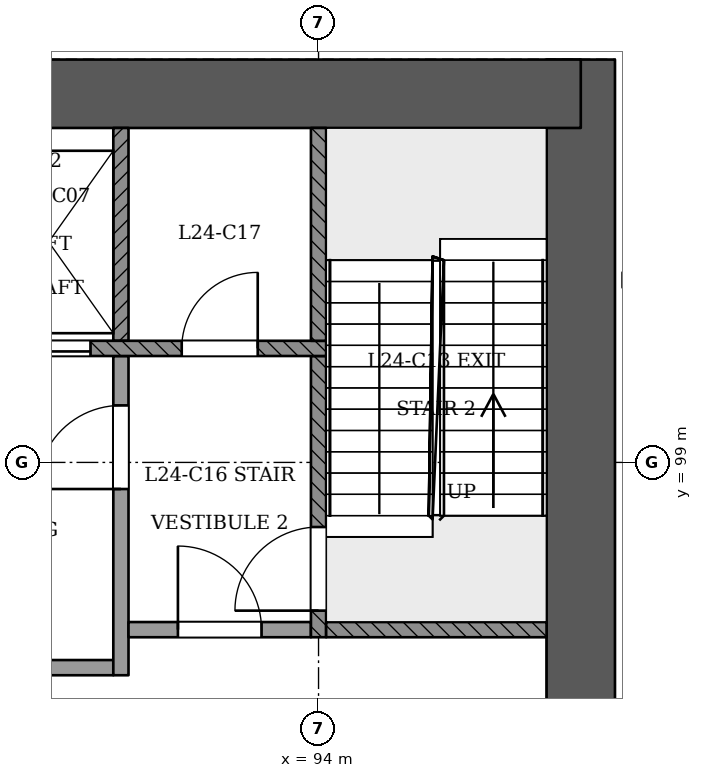
"""IFC4 building model, lengths in metres.
Left out: names, types, materials, properties, quantities, classifications, styles, units other than length and angle.
Written with IfcOpenShell. Run it as: python <this file> out.ifc"""

import sys

from ifc_helpers import new_model, si_unit, direction, frame, frame_2d, origin, place, context, subcontext, project, spatial, rectangle, extrude, element, fill, save


model = new_model("IFC4")
c1 = context("Model", 3, precision=1e-05, world=origin(), true_north=direction((0.0, 1.0)))
c2 = subcontext(c1, "Body", "Model", "MODEL_VIEW")
j1 = project(units=[si_unit("LENGTHUNIT", "METRE"), si_unit("PLANEANGLEUNIT", "RADIAN")], contexts=[c1])
p1 = place(None, origin())
s1 = spatial("IfcSite", under=j1, at=p1, CompositionType="ELEMENT")
p2 = place(p1, origin())
s2 = spatial("IfcBuilding", under=s1, at=p2, CompositionType="ELEMENT")
p3 = place(p2, frame((0.0, 0.0, 95.4)))
s3 = spatial("IfcBuildingStorey", under=s2, at=p3, CompositionType="ELEMENT", Elevation=95.4)
p4 = place(p3, frame((97.45, 92.95, 0.0), z_axis=(0.0, 0.0, 1.0), x_axis=(0.0, 1.0, 0.0)))
e1 = element("IfcWall", 1, at=p4, inside=s3, PredefinedType="SHEAR", context=c2, shape_type="SweptSolid", body=[
    extrude(rectangle(XDim=11.35, YDim=0.9, at=frame_2d((5.675, 0.0))), origin(), (0.0, 0.0, 1.0), 5.4),
])
p5 = place(p3, frame((97.45, 103.85, 0.0), z_axis=(0.0, 0.0, 1.0), x_axis=(-1.0, 0.0, 0.0)))
e2 = element("IfcWall", 2, at=p5, inside=s3, PredefinedType="SHEAR", context=c2, shape_type="SweptSolid", body=[
    extrude(rectangle(XDim=25.35, YDim=0.9, at=frame_2d((12.675, 0.0))), origin(), (0.0, 0.0, 1.0), 5.4),
])
p6 = place(p3, frame((85.516, 61.158, 0.0), z_axis=(0.0, 0.0, 1.0), x_axis=(0.499997295205, 0.866026965393, 0.0)))
e3 = element("IfcWall", 3, at=p6, inside=s3, PredefinedType="PARTITIONING", context=c2, shape_type="SweptSolid", body=[
    extrude(rectangle(XDim=42.086, YDim=0.2, at=frame_2d((21.043, 0.0))), origin(), (0.0, 0.0, 1.0), 4.5),
])
p7 = place(p6, frame((0.2, 0.0, 0.0)))
e4 = element("IfcOpeningElement", 4, at=p7, cuts=e3, PredefinedType="OPENING", context=c2, shape_type="SweptSolid", body=[
    extrude(rectangle(XDim=1.2, YDim=2.4, at=frame_2d((0.6, 1.2))), frame((0.0, 0.11, 0.0), z_axis=(0.0, -1.0, 0.0), x_axis=(1.0, 0.0, 0.0)), (0.0, 0.0, 1.0), 0.221),
])
p8 = place(p6, frame((9.193, 0.0, 0.0)))
e5 = element("IfcOpeningElement", 5, at=p8, cuts=e3, PredefinedType="OPENING", context=c2, shape_type="SweptSolid", body=[
    extrude(rectangle(XDim=1.2, YDim=2.4, at=frame_2d((0.6, 1.2))), frame((0.0, 0.11, 0.0), z_axis=(0.0, -1.0, 0.0), x_axis=(1.0, 0.0, 0.0)), (0.0, 0.0, 1.0), 0.221),
])
p9 = place(p6, frame((20.443, 0.0, 0.0)))
e6 = element("IfcOpeningElement", 6, at=p9, cuts=e3, PredefinedType="OPENING", context=c2, shape_type="SweptSolid", body=[
    extrude(rectangle(XDim=1.2, YDim=2.4, at=frame_2d((0.6, 1.2))), frame((0.0, 0.11, 0.0), z_axis=(0.0, -1.0, 0.0), x_axis=(1.0, 0.0, 0.0)), (0.0, 0.0, 1.0), 0.221),
])
p10 = place(p6, frame((29.443, 0.0, 0.0)))
e7 = element("IfcOpeningElement", 7, at=p10, cuts=e3, PredefinedType="OPENING", context=c2, shape_type="SweptSolid", body=[
    extrude(rectangle(XDim=1.2, YDim=2.4, at=frame_2d((0.6, 1.2))), frame((0.0, 0.11, 0.0), z_axis=(0.0, -1.0, 0.0), x_axis=(1.0, 0.0, 0.0)), (0.0, 0.0, 1.0), 0.221),
])
p11 = place(p6, frame((40.184, 0.0, 0.0)))
e8 = element("IfcOpeningElement", 8, at=p11, cuts=e3, PredefinedType="OPENING", context=c2, shape_type="SweptSolid", body=[
    extrude(rectangle(XDim=1.2, YDim=2.4, at=frame_2d((0.6, 1.2))), frame((0.0, 0.11, 0.0), z_axis=(0.0, -1.0, 0.0), x_axis=(1.0, 0.0, 0.0)), (0.0, 0.0, 1.0), 0.221),
])
p12 = place(p3, frame((99.7, 101.4, 0.0), z_axis=(0.0, 0.0, 1.0), x_axis=(-1.0, 0.0, 0.0)))
e9 = element("IfcWall", 9, at=p12, inside=s3, PredefinedType="PARTITIONING", context=c2, shape_type="SweptSolid", body=[
    extrude(rectangle(XDim=1.7, YDim=0.2, at=frame_2d((0.85, 0.0))), origin(), (0.0, 0.0, 1.0), 4.9),
])
p13 = place(p3, frame((87.7, 96.3, 0.0), z_axis=(0.0, 0.0, 1.0), x_axis=(1.0, 0.0, 0.0)))
e10 = element("IfcWall", 10, at=p13, inside=s3, PredefinedType="PARTITIONING", context=c2, shape_type="SweptSolid", body=[
    extrude(rectangle(XDim=3.6, YDim=0.2, at=frame_2d((1.8, 0.0))), origin(), (0.0, 0.0, 1.0), 4.9),
])
p14 = place(p3, frame((91.4, 96.2, 0.0), z_axis=(0.0, 0.0, 1.0), x_axis=(0.0, 1.0, 0.0)))
e11 = element("IfcWall", 11, at=p14, inside=s3, PredefinedType="PARTITIONING", context=c2, shape_type="SweptSolid", body=[
    extrude(rectangle(XDim=4.2, YDim=0.2, at=frame_2d((2.1, 0.0))), origin(), (0.0, 0.0, 1.0), 4.9),
])
p15 = place(p14, frame((2.45, 0.0, 0.0)))
e12 = element("IfcOpeningElement", 12, at=p15, cuts=e11, PredefinedType="OPENING", context=c2, shape_type="SweptSolid", body=[
    extrude(rectangle(XDim=1.1, YDim=2.1, at=frame_2d((0.55, 1.05))), frame((0.0, 0.11, 0.0), z_axis=(0.0, -1.0, 0.0), x_axis=(1.0, 0.0, 0.0)), (0.0, 0.0, 1.0), 0.221),
])
p16 = place(p3, frame((91.5, 96.8, 0.0), z_axis=(0.0, 0.0, 1.0), x_axis=(1.0, 0.0, 0.0)))
e13 = element("IfcWall", 13, at=p16, inside=s3, PredefinedType="PARTITIONING", context=c2, shape_type="SweptSolid", body=[
    extrude(rectangle(XDim=2.4, YDim=0.2, at=frame_2d((1.2, 0.0))), origin(), (0.0, 0.0, 1.0), 4.9),
])
p17 = place(p16, frame((0.65, 0.0, 0.0)))
e14 = element("IfcOpeningElement", 14, at=p17, cuts=e13, PredefinedType="OPENING", context=c2, shape_type="SweptSolid", body=[
    extrude(rectangle(XDim=1.1, YDim=2.1, at=frame_2d((0.55, 1.05))), frame((0.0, 0.11, 0.0), z_axis=(0.0, -1.0, 0.0), x_axis=(1.0, 0.0, 0.0)), (0.0, 0.0, 1.0), 0.221),
])
p18 = place(p3, frame((94.0, 96.7, 0.0), z_axis=(0.0, 0.0, 1.0), x_axis=(0.0, 1.0, 0.0)))
e15 = element("IfcWall", 15, at=p18, inside=s3, PredefinedType="SOLIDWALL", context=c2, shape_type="SweptSolid", body=[
    extrude(rectangle(XDim=3.7, YDim=0.2, at=frame_2d((1.85, 0.0))), origin(), (0.0, 0.0, 1.0), 4.9),
])
p19 = place(p18, frame((0.35, 0.0, 0.0)))
e16 = element("IfcOpeningElement", 16, at=p19, cuts=e15, PredefinedType="OPENING", context=c2, shape_type="SweptSolid", body=[
    extrude(rectangle(XDim=1.1, YDim=2.1, at=frame_2d((0.55, 1.05))), frame((0.0, 0.11, 0.0), z_axis=(0.0, -1.0, 0.0), x_axis=(1.0, 0.0, 0.0)), (0.0, 0.0, 1.0), 0.221),
])
p20 = place(p3, frame((94.1, 96.8, 0.0), z_axis=(0.0, 0.0, 1.0), x_axis=(1.0, 0.0, 0.0)))
e17 = element("IfcWall", 17, at=p20, inside=s3, PredefinedType="SOLIDWALL", context=c2, shape_type="SweptSolid", body=[
    extrude(rectangle(XDim=2.9, YDim=0.2, at=frame_2d((1.45, 0.0))), origin(), (0.0, 0.0, 1.0), 4.9),
])
p21 = place(p3, frame((75.9, 100.5, 0.0), z_axis=(0.0, 0.0, 1.0), x_axis=(1.0, 0.0, 0.0)))
e18 = element("IfcWall", 18, at=p21, inside=s3, PredefinedType="SOLIDWALL", context=c2, shape_type="SweptSolid", body=[
    extrude(rectangle(XDim=18.2, YDim=0.2, at=frame_2d((9.1, 0.0))), origin(), (0.0, 0.0, 1.0), 4.9),
])
p22 = place(p21, frame((2.6, 0.0, 0.0)))
e19 = element("IfcOpeningElement", 19, at=p22, cuts=e18, PredefinedType="OPENING", context=c2, shape_type="SweptSolid", body=[
    extrude(rectangle(XDim=1.1, YDim=2.1, at=frame_2d((0.55, 1.05))), frame((0.0, 0.11, 0.0), z_axis=(0.0, -1.0, 0.0), x_axis=(1.0, 0.0, 0.0)), (0.0, 0.0, 1.0), 0.221),
])
p23 = place(p21, frame((4.5, 0.0, 0.0)))
e20 = element("IfcOpeningElement", 20, at=p23, cuts=e18, PredefinedType="OPENING", context=c2, shape_type="SweptSolid", body=[
    extrude(rectangle(XDim=1.1, YDim=2.1, at=frame_2d((0.55, 1.05))), frame((0.0, 0.11, 0.0), z_axis=(0.0, -1.0, 0.0), x_axis=(1.0, 0.0, 0.0)), (0.0, 0.0, 1.0), 0.221),
])
p24 = place(p21, frame((6.4, 0.0, 0.0)))
e21 = element("IfcOpeningElement", 21, at=p24, cuts=e18, PredefinedType="OPENING", context=c2, shape_type="SweptSolid", body=[
    extrude(rectangle(XDim=1.1, YDim=2.1, at=frame_2d((0.55, 1.05))), frame((0.0, 0.11, 0.0), z_axis=(0.0, -1.0, 0.0), x_axis=(1.0, 0.0, 0.0)), (0.0, 0.0, 1.0), 0.221),
])
p25 = place(p21, frame((8.3, 0.0, 0.0)))
e22 = element("IfcOpeningElement", 22, at=p25, cuts=e18, PredefinedType="OPENING", context=c2, shape_type="SweptSolid", body=[
    extrude(rectangle(XDim=1.1, YDim=2.1, at=frame_2d((0.55, 1.05))), frame((0.0, 0.11, 0.0), z_axis=(0.0, -1.0, 0.0), x_axis=(1.0, 0.0, 0.0)), (0.0, 0.0, 1.0), 0.221),
])
p26 = place(p21, frame((10.2, 0.0, 0.0)))
e23 = element("IfcOpeningElement", 23, at=p26, cuts=e18, PredefinedType="OPENING", context=c2, shape_type="SweptSolid", body=[
    extrude(rectangle(XDim=1.1, YDim=2.1, at=frame_2d((0.55, 1.05))), frame((0.0, 0.11, 0.0), z_axis=(0.0, -1.0, 0.0), x_axis=(1.0, 0.0, 0.0)), (0.0, 0.0, 1.0), 0.221),
])
p27 = place(p21, frame((12.1, 0.0, 0.0)))
e24 = element("IfcOpeningElement", 24, at=p27, cuts=e18, PredefinedType="OPENING", context=c2, shape_type="SweptSolid", body=[
    extrude(rectangle(XDim=1.1, YDim=2.1, at=frame_2d((0.55, 1.05))), frame((0.0, 0.11, 0.0), z_axis=(0.0, -1.0, 0.0), x_axis=(1.0, 0.0, 0.0)), (0.0, 0.0, 1.0), 0.221),
])
p28 = place(p21, frame((14.0, 0.0, 0.0)))
e25 = element("IfcOpeningElement", 25, at=p28, cuts=e18, PredefinedType="OPENING", context=c2, shape_type="SweptSolid", body=[
    extrude(rectangle(XDim=1.1, YDim=2.1, at=frame_2d((0.55, 1.05))), frame((0.0, 0.11, 0.0), z_axis=(0.0, -1.0, 0.0), x_axis=(1.0, 0.0, 0.0)), (0.0, 0.0, 1.0), 0.221),
])
p29 = place(p21, frame((0.65, 0.0, 0.0)))
e26 = element("IfcOpeningElement", 26, at=p29, cuts=e18, PredefinedType="OPENING", context=c2, shape_type="SweptSolid", body=[
    extrude(rectangle(XDim=1.0, YDim=2.1, at=frame_2d((0.5, 1.05))), frame((0.0, 0.11, 0.0), z_axis=(0.0, -1.0, 0.0), x_axis=(1.0, 0.0, 0.0)), (0.0, 0.0, 1.0), 0.221),
])
p30 = place(p21, frame((16.3, 0.0, 0.0)))
e27 = element("IfcOpeningElement", 27, at=p30, cuts=e18, PredefinedType="OPENING", context=c2, shape_type="SweptSolid", body=[
    extrude(rectangle(XDim=1.0, YDim=2.1, at=frame_2d((0.5, 1.05))), frame((0.0, 0.11, 0.0), z_axis=(0.0, -1.0, 0.0), x_axis=(1.0, 0.0, 0.0)), (0.0, 0.0, 1.0), 0.221),
])
for number, where, z_axis, x_axis in (
    (28, (91.4, 100.6, 0.0), (0.0, 0.0, 1.0), (0.0, 1.0, 0.0)),
    (29, (94.0, 100.6, 0.0), (0.0, 0.0, 1.0), (0.0, 1.0, 0.0)),
):
    element("IfcWall", number, at=place(p3, frame(where, z_axis=z_axis, x_axis=x_axis)), inside=s3, PredefinedType="SOLIDWALL", context=c2, shape_type="SweptSolid", body=[
        extrude(rectangle(XDim=2.8, YDim=0.2, at=frame_2d((1.4, 0.0))), origin(), (0.0, 0.0, 1.0), 4.9),
    ])
p31 = place(p28, origin())
e30 = element("IfcDoor", 30, at=p31, inside=s3, OperationType="SLIDING_TO_LEFT", PredefinedType="NOTDEFINED", context=c2, shape_type="SweptSolid", body=[
    extrude(rectangle(XDim=1.1, YDim=2.1, at=frame_2d((0.55, 1.05))), frame((0.0, 0.025, 0.0), z_axis=(0.0, -1.0, 0.0), x_axis=(1.0, 0.0, 0.0)), (0.0, 0.0, 1.0), 0.05),
])
fill(e25, e30)
p32 = place(p19, origin())
e31 = element("IfcDoor", 31, at=p32, inside=s3, OperationType="SINGLE_SWING_LEFT", PredefinedType="NOTDEFINED", context=c2, shape_type="SweptSolid", body=[
    extrude(rectangle(XDim=1.1, YDim=2.1, at=frame_2d((0.55, 1.05))), frame((0.0, 0.025, 0.0), z_axis=(0.0, -1.0, 0.0), x_axis=(1.0, 0.0, 0.0)), (0.0, 0.0, 1.0), 0.05),
])
fill(e16, e31)
p33 = place(p15, origin())
e32 = element("IfcDoor", 32, at=p33, inside=s3, OperationType="SINGLE_SWING_LEFT", PredefinedType="NOTDEFINED", context=c2, shape_type="SweptSolid", body=[
    extrude(rectangle(XDim=1.1, YDim=2.1, at=frame_2d((0.55, 1.05))), frame((0.0, 0.025, 0.0), z_axis=(0.0, -1.0, 0.0), x_axis=(1.0, 0.0, 0.0)), (0.0, 0.0, 1.0), 0.05),
])
fill(e12, e32)
p34 = place(p30, origin())
e33 = element("IfcDoor", 33, at=p34, inside=s3, OperationType="SINGLE_SWING_RIGHT", PredefinedType="NOTDEFINED", context=c2, shape_type="SweptSolid", body=[
    extrude(rectangle(XDim=1.0, YDim=2.1, at=frame_2d((0.5, 1.05))), frame((0.0, 0.025, 0.0), z_axis=(0.0, -1.0, 0.0), x_axis=(1.0, 0.0, 0.0)), (0.0, 0.0, 1.0), 0.05),
])
fill(e27, e33)
p35 = place(p17, origin())
e34 = element("IfcDoor", 34, at=p35, inside=s3, OperationType="SINGLE_SWING_LEFT", PredefinedType="NOTDEFINED", context=c2, shape_type="SweptSolid", body=[
    extrude(rectangle(XDim=1.1, YDim=2.1, at=frame_2d((0.55, 1.05))), frame((0.0, 0.025, 0.0), z_axis=(0.0, -1.0, 0.0), x_axis=(1.0, 0.0, 0.0)), (0.0, 0.0, 1.0), 0.05),
])
fill(e14, e34)
save(model, sys.argv[1])
